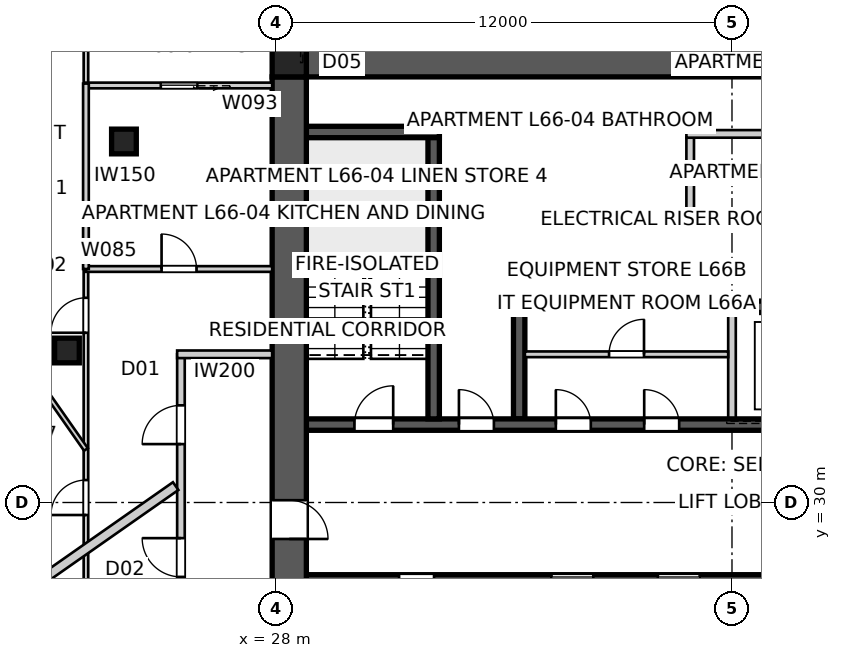
"""IFC4 building model, lengths in metres.
Left out: names, types, materials, properties, quantities, classifications, styles, units other than length and angle.
Written with IfcOpenShell. Run it as: python <this file> out.ifc"""

import sys

from ifc_helpers import new_model, si_unit, direction, frame, frame_2d, origin, origin_2d, place, context, subcontext, project, spatial, polyline, rectangle, outline, extrude, element, fill, save


model = new_model("IFC4")
c1 = context("Model", 3, precision=1e-05, world=origin(), true_north=direction((0.0, 1.0)))
c2 = subcontext(c1, "Body", "Model", "MODEL_VIEW")
j1 = project(units=[si_unit("LENGTHUNIT", "METRE"), si_unit("PLANEANGLEUNIT", "RADIAN")], contexts=[c1])
p1 = place(None, origin())
s1 = spatial("IfcSite", under=j1, at=p1, CompositionType="ELEMENT")
p2 = place(p1, origin())
s2 = spatial("IfcBuilding", under=s1, at=p2, CompositionType="ELEMENT")
p3 = place(p2, frame((0.0, 0.0, 240.4)))
s3 = spatial("IfcBuildingStorey", under=s2, at=p3, CompositionType="ELEMENT", Elevation=240.4)
p4 = place(p3, frame((28.8, 41.65, 0.0), z_axis=(0.0, 0.0, 1.0), x_axis=(1.0, 0.0, 0.0)))
e1 = element("IfcWall", 1, at=p4, inside=s3, PredefinedType="SHEAR", context=c2, shape_type="SweptSolid", body=[
    extrude(outline(polyline([(0.0, -0.45), (22.4, -0.45), (22.4, -0.025), (22.85, -0.025), (22.85, 0.025), (22.4, 0.025), (22.4, 0.45), (0.0, 0.45), (0.0, 0.025), (-0.45, 0.025), (-0.45, -0.025), (0.0, -0.025), (0.0, -0.45)])), origin(), (0.0, 0.0, 1.0), 3.4),
])
p5 = place(p3, frame((28.35, 41.2, 0.0), z_axis=(0.0, 0.0, 1.0), x_axis=(0.0, -1.0, 0.0)))
e2 = element("IfcWall", 2, at=p5, inside=s3, PredefinedType="SHEAR", context=c2, shape_type="SweptSolid", body=[
    extrude(outline(polyline([(0.0, -0.45), (22.4, -0.45), (22.4, -0.025), (22.85, -0.025), (22.85, 0.025), (22.4, 0.025), (22.4, 0.45), (0.0, 0.45), (0.0, 0.025), (-0.45, 0.025), (-0.45, -0.025), (0.0, -0.025), (0.0, -0.45)])), origin(), (0.0, 0.0, 1.0), 3.4),
])
p6 = place(p5, frame((11.14, 0.0, 0.0)))
e3 = element("IfcOpeningElement", 3, at=p6, cuts=e2, PredefinedType="OPENING", context=c2, shape_type="SweptSolid", body=[
    extrude(rectangle(XDim=1.02, YDim=2.4, at=frame_2d((0.51, 1.2))), frame((0.0, 0.46, 0.0), z_axis=(0.0, -1.0, 0.0), x_axis=(1.0, 0.0, 0.0)), (0.0, 0.0, 1.0), 0.92),
])
p7 = place(p3, frame((28.8, 32.05, 0.0), z_axis=(0.0, 0.0, 1.0), x_axis=(1.0, 0.0, 0.0)))
e4 = element("IfcWall", 4, at=p7, inside=s3, PredefinedType="SHEAR", context=c2, shape_type="SweptSolid", body=[
    extrude(rectangle(XDim=22.4, YDim=0.3, at=frame_2d((11.2, 0.0))), origin(), (0.0, 0.0, 1.0), 3.4),
])
p8 = place(p7, frame((19.04, 0.0, 0.0)))
e5 = element("IfcOpeningElement", 5, at=p8, cuts=e4, PredefinedType="OPENING", context=c2, shape_type="SweptSolid", body=[
    extrude(rectangle(XDim=0.92, YDim=2.1, at=frame_2d((0.46, 1.05))), frame((0.0, 0.16, 0.0), z_axis=(0.0, -1.0, 0.0), x_axis=(1.0, 0.0, 0.0)), (0.0, 0.0, 1.0), 0.32),
])
p9 = place(p7, frame((1.265, 0.0, 0.0)))
e6 = element("IfcOpeningElement", 6, at=p9, cuts=e4, PredefinedType="OPENING", context=c2, shape_type="SweptSolid", body=[
    extrude(rectangle(XDim=1.02, YDim=2.1, at=frame_2d((0.51, 1.05))), frame((0.0, 0.16, 0.0), z_axis=(0.0, -1.0, 0.0), x_axis=(1.0, 0.0, 0.0)), (0.0, 0.0, 1.0), 0.32),
])
p10 = place(p7, frame((4.015, 0.0, 0.0)))
e7 = element("IfcOpeningElement", 7, at=p10, cuts=e4, PredefinedType="OPENING", context=c2, shape_type="SweptSolid", body=[
    extrude(rectangle(XDim=0.92, YDim=2.1, at=frame_2d((0.46, 1.05))), frame((0.0, 0.16, 0.0), z_axis=(0.0, -1.0, 0.0), x_axis=(1.0, 0.0, 0.0)), (0.0, 0.0, 1.0), 0.32),
])
p11 = place(p7, frame((6.565, 0.0, 0.0)))
e8 = element("IfcOpeningElement", 8, at=p11, cuts=e4, PredefinedType="OPENING", context=c2, shape_type="SweptSolid", body=[
    extrude(rectangle(XDim=0.92, YDim=2.1, at=frame_2d((0.46, 1.05))), frame((0.0, 0.16, 0.0), z_axis=(0.0, -1.0, 0.0), x_axis=(1.0, 0.0, 0.0)), (0.0, 0.0, 1.0), 0.32),
])
p12 = place(p7, frame((8.89, 0.0, 0.0)))
e9 = element("IfcOpeningElement", 9, at=p12, cuts=e4, PredefinedType="OPENING", context=c2, shape_type="SweptSolid", body=[
    extrude(rectangle(XDim=0.92, YDim=2.1, at=frame_2d((0.46, 1.05))), frame((0.0, 0.16, 0.0), z_axis=(0.0, -1.0, 0.0), x_axis=(1.0, 0.0, 0.0)), (0.0, 0.0, 1.0), 0.32),
])
p13 = place(p7, frame((12.05, 0.0, 0.0)))
e10 = element("IfcOpeningElement", 10, at=p13, cuts=e4, PredefinedType="OPENING", context=c2, shape_type="SweptSolid", body=[
    extrude(rectangle(XDim=1.1, YDim=2.1, at=frame_2d((0.55, 1.05))), frame((0.0, 0.16, 0.0), z_axis=(0.0, -1.0, 0.0), x_axis=(1.0, 0.0, 0.0)), (0.0, 0.0, 1.0), 0.32),
])
p14 = place(p7, frame((14.85, 0.0, 0.0)))
e11 = element("IfcOpeningElement", 11, at=p14, cuts=e4, PredefinedType="OPENING", context=c2, shape_type="SweptSolid", body=[
    extrude(rectangle(XDim=1.1, YDim=2.1, at=frame_2d((0.55, 1.05))), frame((0.0, 0.16, 0.0), z_axis=(0.0, -1.0, 0.0), x_axis=(1.0, 0.0, 0.0)), (0.0, 0.0, 1.0), 0.32),
])
p15 = place(p3, frame((51.2, 27.95, 0.0), z_axis=(0.0, 0.0, 1.0), x_axis=(-1.0, 0.0, 0.0)))
e12 = element("IfcWall", 12, at=p15, inside=s3, PredefinedType="SHEAR", context=c2, shape_type="SweptSolid", body=[
    extrude(rectangle(XDim=22.4, YDim=0.3, at=frame_2d((11.2, 0.0))), origin(), (0.0, 0.0, 1.0), 3.4),
])
p16 = place(p15, frame((19.04, 0.0, 0.0)))
e13 = element("IfcOpeningElement", 13, at=p16, cuts=e12, PredefinedType="OPENING", context=c2, shape_type="SweptSolid", body=[
    extrude(rectangle(XDim=0.92, YDim=2.1, at=frame_2d((0.46, 1.05))), frame((0.0, 0.16, 0.0), z_axis=(0.0, -1.0, 0.0), x_axis=(1.0, 0.0, 0.0)), (0.0, 0.0, 1.0), 0.32),
])
p17 = place(p15, frame((1.265, 0.0, 0.0)))
e14 = element("IfcOpeningElement", 14, at=p17, cuts=e12, PredefinedType="OPENING", context=c2, shape_type="SweptSolid", body=[
    extrude(rectangle(XDim=1.02, YDim=2.1, at=frame_2d((0.51, 1.05))), frame((0.0, 0.16, 0.0), z_axis=(0.0, -1.0, 0.0), x_axis=(1.0, 0.0, 0.0)), (0.0, 0.0, 1.0), 0.32),
])
p18 = place(p15, frame((4.015, 0.0, 0.0)))
e15 = element("IfcOpeningElement", 15, at=p18, cuts=e12, PredefinedType="OPENING", context=c2, shape_type="SweptSolid", body=[
    extrude(rectangle(XDim=0.92, YDim=2.1, at=frame_2d((0.46, 1.05))), frame((0.0, 0.16, 0.0), z_axis=(0.0, -1.0, 0.0), x_axis=(1.0, 0.0, 0.0)), (0.0, 0.0, 1.0), 0.32),
])
p19 = place(p15, frame((8.89, 0.0, 0.0)))
e16 = element("IfcOpeningElement", 16, at=p19, cuts=e12, PredefinedType="OPENING", context=c2, shape_type="SweptSolid", body=[
    extrude(rectangle(XDim=0.92, YDim=2.1, at=frame_2d((0.46, 1.05))), frame((0.0, 0.16, 0.0), z_axis=(0.0, -1.0, 0.0), x_axis=(1.0, 0.0, 0.0)), (0.0, 0.0, 1.0), 0.32),
])
p20 = place(p15, frame((6.565, 0.0, 0.0)))
e17 = element("IfcOpeningElement", 17, at=p20, cuts=e12, PredefinedType="OPENING", context=c2, shape_type="SweptSolid", body=[
    extrude(rectangle(XDim=0.92, YDim=2.1, at=frame_2d((0.46, 1.05))), frame((0.0, 0.16, 0.0), z_axis=(0.0, -1.0, 0.0), x_axis=(1.0, 0.0, 0.0)), (0.0, 0.0, 1.0), 0.32),
])
p21 = place(p15, frame((12.05, 0.0, 0.0)))
e18 = element("IfcOpeningElement", 18, at=p21, cuts=e12, PredefinedType="OPENING", context=c2, shape_type="SweptSolid", body=[
    extrude(rectangle(XDim=1.1, YDim=2.1, at=frame_2d((0.55, 1.05))), frame((0.0, 0.16, 0.0), z_axis=(0.0, -1.0, 0.0), x_axis=(1.0, 0.0, 0.0)), (0.0, 0.0, 1.0), 0.32),
])
p22 = place(p15, frame((14.85, 0.0, 0.0)))
e19 = element("IfcOpeningElement", 19, at=p22, cuts=e12, PredefinedType="OPENING", context=c2, shape_type="SweptSolid", body=[
    extrude(rectangle(XDim=1.1, YDim=2.1, at=frame_2d((0.55, 1.05))), frame((0.0, 0.16, 0.0), z_axis=(0.0, -1.0, 0.0), x_axis=(1.0, 0.0, 0.0)), (0.0, 0.0, 1.0), 0.32),
])
p23 = place(p3, frame((34.25, 35.15, 0.0), z_axis=(0.0, 0.0, 1.0), x_axis=(1.0, 0.0, 0.0)))
e20 = element("IfcWall", 20, at=p23, inside=s3, PredefinedType="SHEAR", context=c2, shape_type="SweptSolid", body=[
    extrude(rectangle(XDim=11.5, YDim=0.3, at=frame_2d((5.75, 0.0))), origin(), (0.0, 0.0, 1.0), 3.4),
])
p24 = place(p3, frame((34.4, 32.2, 0.0), z_axis=(0.0, 0.0, 1.0), x_axis=(0.0, 1.0, 0.0)))
e21 = element("IfcWall", 21, at=p24, inside=s3, PredefinedType="SHEAR", context=c2, shape_type="SweptSolid", body=[
    extrude(rectangle(XDim=2.8, YDim=0.3, at=frame_2d((1.4, 0.0))), origin(), (0.0, 0.0, 1.0), 3.4),
])
p25 = place(p3, frame((40.0, 32.2, 0.0), z_axis=(0.0, 0.0, 1.0), x_axis=(0.0, 1.0, 0.0)))
e22 = element("IfcWall", 22, at=p25, inside=s3, PredefinedType="SOLIDWALL", context=c2, shape_type="SweptSolid", body=[
    extrude(rectangle(XDim=2.8, YDim=0.2, at=frame_2d((1.4, 0.0))), origin(), (0.0, 0.0, 1.0), 3.4),
])
p26 = place(p3, frame((32.15, 32.2, 0.0), z_axis=(0.0, 0.0, 1.0), x_axis=(0.0, 1.0, 0.0)))
e23 = element("IfcWall", 23, at=p26, inside=s3, PredefinedType="SHEAR", context=c2, shape_type="SweptSolid", body=[
    extrude(rectangle(XDim=7.7, YDim=0.3, at=frame_2d((3.85, 0.0))), origin(), (0.0, 0.0, 1.0), 3.4),
])
p27 = place(p3, frame((28.8, 39.75, 0.0), z_axis=(0.0, 0.0, 1.0), x_axis=(1.0, 0.0, 0.0)))
e24 = element("IfcWall", 24, at=p27, inside=s3, PredefinedType="SHEAR", context=c2, shape_type="SweptSolid", body=[
    extrude(rectangle(XDim=3.5, YDim=0.3, at=frame_2d((1.75, 0.0))), origin(), (0.0, 0.0, 1.0), 3.4),
])
p28 = place(p3, frame((38.9, 37.6, 0.0), z_axis=(0.0, 0.0, 1.0), x_axis=(0.0, 1.0, 0.0)))
e25 = element("IfcWall", 25, at=p28, inside=s3, PredefinedType="SOLIDWALL", context=c2, shape_type="SweptSolid", body=[
    extrude(rectangle(XDim=2.0, YDim=0.2, at=frame_2d((1.0, 0.0))), origin(), (0.0, 0.0, 1.0), 3.4),
])
for number, where, z_axis, x_axis in (
    (26, (38.8, 37.5, 0.0), (0.0, 0.0, 1.0), (1.0, 0.0, 0.0)),
    (27, (38.8, 39.7, 0.0), (0.0, 0.0, 1.0), (1.0, 0.0, 0.0)),
):
    element("IfcWall", number, at=place(p3, frame(where, z_axis=z_axis, x_axis=x_axis)), inside=s3, PredefinedType="SOLIDWALL", context=c2, shape_type="SweptSolid", body=[
        extrude(rectangle(XDim=2.4, YDim=0.2, at=frame_2d((1.2, 0.0))), origin(), (0.0, 0.0, 1.0), 3.4),
    ])
p29 = place(p3, frame((28.35, 41.65, 0.0), z_axis=(0.0, 0.0, 1.0), x_axis=(1.0, 0.0, 0.0)))
e28 = element("IfcColumn", 28, at=p29, inside=s3, PredefinedType="COLUMN", context=c2, shape_type="SweptSolid", body=[
    extrude(rectangle(XDim=0.9, YDim=0.9, at=origin_2d()), origin(), (0.0, 0.0, 1.0), 3.4),
])
for number, where, z_axis, x_axis in (
    (29, (24.0, 39.5, 0.0), (0.0, 0.0, 1.0), (1.0, 0.0, 0.0)),
    (30, (22.5, 34.0, 0.0), (0.0, 0.0, 1.0), (1.0, 0.0, 0.0)),
):
    element("IfcColumn", number, at=place(p3, frame(where, z_axis=z_axis, x_axis=x_axis)), inside=s3, PredefinedType="COLUMN", context=c2, shape_type="SweptSolid", body=[
        extrude(rectangle(XDim=0.65, YDim=0.65, at=origin_2d()), origin(), (0.0, 0.0, 1.0), 3.4),
    ])
p30 = place(p3, frame((25.5, 26.1, 0.0), z_axis=(0.0, 0.0, 1.0), x_axis=(0.0, 1.0, 0.0)))
e31 = element("IfcWall", 31, at=p30, inside=s3, PredefinedType="PARTITIONING", context=c2, shape_type="SweptSolid", body=[
    extrude(rectangle(XDim=7.8, YDim=0.2, at=frame_2d((3.9, 0.0))), origin(), (0.0, 0.0, 1.0), 3.25),
])
p31 = place(p30, frame((1.942, 0.0, 0.0)))
e32 = element("IfcOpeningElement", 32, at=p31, cuts=e31, PredefinedType="OPENING", context=c2, shape_type="SweptSolid", body=[
    extrude(rectangle(XDim=1.02, YDim=2.34, at=frame_2d((0.51, 1.17))), frame((0.0, 0.11, 0.0), z_axis=(0.0, -1.0, 0.0), x_axis=(1.0, 0.0, 0.0)), (0.0, 0.0, 1.0), 0.22),
])
p32 = place(p30, frame((5.437, 0.0, 0.0)))
e33 = element("IfcOpeningElement", 33, at=p32, cuts=e31, PredefinedType="OPENING", context=c2, shape_type="SweptSolid", body=[
    extrude(rectangle(XDim=1.02, YDim=2.34, at=frame_2d((0.51, 1.17))), frame((0.0, 0.11, 0.0), z_axis=(0.0, -1.0, 0.0), x_axis=(1.0, 0.0, 0.0)), (0.0, 0.0, 1.0), 0.22),
])
p33 = place(p3, frame((27.9, 33.9, 0.0), z_axis=(0.0, 0.0, 1.0), x_axis=(-1.0, 0.0, 0.0)))
e34 = element("IfcWall", 34, at=p33, inside=s3, PredefinedType="PARTITIONING", context=c2, shape_type="SweptSolid", body=[
    extrude(rectangle(XDim=2.5, YDim=0.2, at=frame_2d((1.25, 0.0))), origin(), (0.0, 0.0, 1.0), 3.25),
])
p34 = place(p3, frame((17.369, 24.836, 0.0), z_axis=(0.0, 0.0, 1.0), x_axis=(0.81915902312, 0.573566469418, 0.0)))
e35 = element("IfcWall", 35, at=p34, inside=s3, PredefinedType="PARTITIONING", context=c2, shape_type="SweptSolid", body=[
    extrude(rectangle(XDim=9.756, YDim=0.25, at=frame_2d((4.878, 0.0))), origin(), (0.0, 0.0, 1.0), 3.25),
])
p35 = place(p3, frame((23.0, 16.864, 0.0), z_axis=(0.0, 0.0, 1.0), x_axis=(0.0, 1.0, 0.0)))
e36 = element("IfcWall", 36, at=p35, inside=s3, PredefinedType="PARTITIONING", context=c2, shape_type="SweptSolid", body=[
    extrude(rectangle(XDim=19.28, YDim=0.12, at=frame_2d((9.64, 0.0))), origin(), (0.0, 0.0, 1.0), 2.55),
])
p36 = place(p35, frame((9.599, 0.0, 0.0)))
e37 = element("IfcOpeningElement", 37, at=p36, cuts=e36, PredefinedType="OPENING", context=c2, shape_type="SweptSolid", body=[
    extrude(rectangle(XDim=0.92, YDim=2.34, at=frame_2d((0.46, 1.17))), frame((0.0, 0.07, 0.0), z_axis=(0.0, -1.0, 0.0), x_axis=(1.0, 0.0, 0.0)), (0.0, 0.0, 1.0), 0.14),
])
p37 = place(p35, frame((17.603, 0.0, 0.0)))
e38 = element("IfcOpeningElement", 38, at=p37, cuts=e36, PredefinedType="OPENING", context=c2, shape_type="SweptSolid", body=[
    extrude(rectangle(XDim=0.92, YDim=2.34, at=frame_2d((0.46, 1.17))), frame((0.0, 0.07, 0.0), z_axis=(0.0, -1.0, 0.0), x_axis=(1.0, 0.0, 0.0)), (0.0, 0.0, 1.0), 0.14),
])
p38 = place(p35, frame((12.806, 0.0, 0.0)))
e39 = element("IfcOpeningElement", 39, at=p38, cuts=e36, PredefinedType="OPENING", context=c2, shape_type="SweptSolid", body=[
    extrude(rectangle(XDim=0.92, YDim=2.34, at=frame_2d((0.46, 1.17))), frame((0.0, 0.07, 0.0), z_axis=(0.0, -1.0, 0.0), x_axis=(1.0, 0.0, 0.0)), (0.0, 0.0, 1.0), 0.14),
])
p39 = place(p3, frame((23.0, 36.145, 0.0), z_axis=(0.0, 0.0, 1.0), x_axis=(1.0, 0.0, 0.0)))
e40 = element("IfcWall", 40, at=p39, inside=s3, PredefinedType="SOLIDWALL", context=c2, shape_type="SweptSolid", body=[
    extrude(rectangle(XDim=4.9, YDim=0.15, at=frame_2d((2.45, 0.0))), origin(), (0.0, 0.0, 1.0), 3.25),
])
p40 = place(p39, frame((1.99, 0.0, 0.0)))
e41 = element("IfcOpeningElement", 41, at=p40, cuts=e40, PredefinedType="OPENING", context=c2, shape_type="SweptSolid", body=[
    extrude(rectangle(XDim=0.92, YDim=2.34, at=frame_2d((0.46, 1.17))), frame((0.0, 0.085, 0.0), z_axis=(0.0, -1.0, 0.0), x_axis=(1.0, 0.0, 0.0)), (0.0, 0.0, 1.0), 0.17),
])
p41 = place(p3, frame((28.708, 41.18, 0.0), z_axis=(0.0, 0.0, 1.0), x_axis=(0.0, 1.0, 0.0)))
e42 = element("IfcWall", 42, at=p41, inside=s3, PredefinedType="PARTITIONING", context=c2, shape_type="SweptSolid", body=[
    extrude(rectangle(XDim=2.458, YDim=0.12, at=frame_2d((1.229, 0.0))), origin(), (0.0, 0.0, 1.0), 3.25),
])
p42 = place(p41, frame((1.259, 0.0, 0.0)))
e43 = element("IfcOpeningElement", 43, at=p42, cuts=e42, PredefinedType="OPENING", context=c2, shape_type="SweptSolid", body=[
    extrude(rectangle(XDim=0.96, YDim=2.1, at=frame_2d((0.48, 1.05))), frame((0.0, 0.07, 0.0), z_axis=(0.0, -1.0, 0.0), x_axis=(1.0, 0.0, 0.0)), (0.0, 0.0, 1.0), 0.14),
])
p43 = place(p3, frame((23.0, 41.024, 0.0), z_axis=(0.0, 0.0, 1.0), x_axis=(0.0, 1.0, 0.0)))
e44 = element("IfcWall", 44, at=p43, inside=s3, PredefinedType="PARTITIONING", context=c2, shape_type="SweptSolid", body=[
    extrude(rectangle(XDim=2.665, YDim=0.12, at=frame_2d((1.332, 0.0))), origin(), (0.0, 0.0, 1.0), 3.25),
])
p44 = place(p3, frame((27.9, 40.974, 0.0), z_axis=(0.0, 0.0, 1.0), x_axis=(-1.0, 0.0, 0.0)))
e45 = element("IfcWall", 45, at=p44, inside=s3, PredefinedType="SOLIDWALL", context=c2, shape_type="SweptSolid", body=[
    extrude(rectangle(XDim=4.9, YDim=0.15, at=frame_2d((2.45, 0.0))), origin(), (0.0, 0.0, 1.0), 3.25),
])
p45 = place(p44, frame((1.97, 0.0, 0.0)))
e46 = element("IfcOpeningElement", 46, at=p45, cuts=e45, PredefinedType="OPENING", context=c2, shape_type="SweptSolid", body=[
    extrude(rectangle(XDim=0.96, YDim=2.1, at=frame_2d((0.48, 1.05))), frame((0.0, 0.085, 0.0), z_axis=(0.0, -1.0, 0.0), x_axis=(1.0, 0.0, 0.0)), (0.0, 0.0, 1.0), 0.17),
])
p46 = place(p3, frame((23.0, 31.396, 0.0), z_axis=(0.0, 0.0, 1.0), x_axis=(-0.573575545802, 0.819152667857, 0.0)))
e47 = element("IfcWall", 47, at=p46, inside=s3, PredefinedType="PARTITIONING", context=c2, shape_type="SweptSolid", body=[
    extrude(rectangle(XDim=10.566, YDim=0.12, at=frame_2d((5.283, 0.0))), origin(), (0.0, 0.0, 1.0), 3.25),
])
p47 = place(p46, frame((3.958, 0.0, 0.0)))
e48 = element("IfcOpeningElement", 48, at=p47, cuts=e47, PredefinedType="OPENING", context=c2, shape_type="SweptSolid", body=[
    extrude(rectangle(XDim=0.92, YDim=2.34, at=frame_2d((0.46, 1.17))), frame((0.0, 0.07, 0.0), z_axis=(0.0, -1.0, 0.0), x_axis=(1.0, 0.0, 0.0)), (0.0, 0.0, 1.0), 0.14),
])
p48 = place(p46, frame((8.121, 0.0, 0.0)))
e49 = element("IfcOpeningElement", 49, at=p48, cuts=e47, PredefinedType="OPENING", context=c2, shape_type="SweptSolid", body=[
    extrude(rectangle(XDim=0.92, YDim=2.34, at=frame_2d((0.46, 1.17))), frame((0.0, 0.07, 0.0), z_axis=(0.0, -1.0, 0.0), x_axis=(1.0, 0.0, 0.0)), (0.0, 0.0, 1.0), 0.14),
])
p49 = place(p3, frame((23.0, 41.024, 0.0), z_axis=(0.0, 0.0, 1.0), x_axis=(0.0, -1.0, 0.0)))
e50 = element("IfcWall", 50, at=p49, inside=s3, PredefinedType="SOLIDWALL", context=c2, shape_type="SweptSolid", body=[
    extrude(rectangle(XDim=4.879, YDim=0.15, at=frame_2d((2.44, 0.0))), origin(), (0.0, 0.0, 1.0), 3.25),
])
p50 = place(p3, frame((34.55, 33.9, 0.0), z_axis=(0.0, 0.0, 1.0), x_axis=(1.0, 0.0, 0.0)))
e51 = element("IfcWall", 51, at=p50, inside=s3, PredefinedType="SOLIDWALL", context=c2, shape_type="SweptSolid", body=[
    extrude(rectangle(XDim=5.35, YDim=0.15, at=frame_2d((2.675, 0.0))), origin(), (0.0, 0.0, 1.0), 3.25),
])
p51 = place(p50, frame((2.215, 0.0, 0.0)))
e52 = element("IfcOpeningElement", 52, at=p51, cuts=e51, PredefinedType="OPENING", context=c2, shape_type="SweptSolid", body=[
    extrude(rectangle(XDim=0.92, YDim=2.1, at=frame_2d((0.46, 1.05))), frame((0.0, 0.085, 0.0), z_axis=(0.0, -1.0, 0.0), x_axis=(1.0, 0.0, 0.0)), (0.0, 0.0, 1.0), 0.17),
])
p52 = place(p9, origin())
e53 = element("IfcDoor", 53, at=p52, inside=s3, OperationType="SINGLE_SWING_RIGHT", PredefinedType="DOOR", context=c2, shape_type="SweptSolid", body=[
    extrude(rectangle(XDim=1.02, YDim=2.1, at=frame_2d((0.51, 1.05))), frame((0.0, 0.025, 0.0), z_axis=(0.0, -1.0, 0.0), x_axis=(1.0, 0.0, 0.0)), (0.0, 0.0, 1.0), 0.05),
])
fill(e6, e53)
p53 = place(p10, origin())
e54 = element("IfcDoor", 54, at=p53, inside=s3, OperationType="SINGLE_SWING_LEFT", PredefinedType="DOOR", context=c2, shape_type="SweptSolid", body=[
    extrude(rectangle(XDim=0.92, YDim=2.1, at=frame_2d((0.46, 1.05))), frame((0.0, 0.025, 0.0), z_axis=(0.0, -1.0, 0.0), x_axis=(1.0, 0.0, 0.0)), (0.0, 0.0, 1.0), 0.05),
])
fill(e7, e54)
p54 = place(p31, origin())
e55 = element("IfcDoor", 55, at=p54, inside=s3, OperationType="SINGLE_SWING_RIGHT", PredefinedType="DOOR", context=c2, shape_type="SweptSolid", body=[
    extrude(rectangle(XDim=1.02, YDim=2.34, at=frame_2d((0.51, 1.17))), frame((0.0, 0.025, 0.0), z_axis=(0.0, -1.0, 0.0), x_axis=(1.0, 0.0, 0.0)), (0.0, 0.0, 1.0), 0.05),
])
fill(e32, e55)
p55 = place(p32, origin())
e56 = element("IfcDoor", 56, at=p55, inside=s3, OperationType="SINGLE_SWING_LEFT", PredefinedType="DOOR", context=c2, shape_type="SweptSolid", body=[
    extrude(rectangle(XDim=1.02, YDim=2.34, at=frame_2d((0.51, 1.17))), frame((0.0, 0.025, 0.0), z_axis=(0.0, -1.0, 0.0), x_axis=(1.0, 0.0, 0.0)), (0.0, 0.0, 1.0), 0.05),
])
fill(e33, e56)
p56 = place(p40, origin())
e57 = element("IfcDoor", 57, at=p56, inside=s3, OperationType="SINGLE_SWING_LEFT", PredefinedType="DOOR", context=c2, shape_type="SweptSolid", body=[
    extrude(rectangle(XDim=0.92, YDim=2.34, at=frame_2d((0.46, 1.17))), frame((0.0, 0.025, 0.0), z_axis=(0.0, -1.0, 0.0), x_axis=(1.0, 0.0, 0.0)), (0.0, 0.0, 1.0), 0.05),
])
fill(e41, e57)
p57 = place(p37, origin())
e58 = element("IfcDoor", 58, at=p57, inside=s3, OperationType="SINGLE_SWING_LEFT", PredefinedType="DOOR", context=c2, shape_type="SweptSolid", body=[
    extrude(rectangle(XDim=0.92, YDim=2.34, at=frame_2d((0.46, 1.17))), frame((0.0, 0.025, 0.0), z_axis=(0.0, -1.0, 0.0), x_axis=(1.0, 0.0, 0.0)), (0.0, 0.0, 1.0), 0.05),
])
fill(e38, e58)
p58 = place(p38, origin())
e59 = element("IfcDoor", 59, at=p58, inside=s3, OperationType="SINGLE_SWING_LEFT", PredefinedType="DOOR", context=c2, shape_type="SweptSolid", body=[
    extrude(rectangle(XDim=0.92, YDim=2.34, at=frame_2d((0.46, 1.17))), frame((0.0, 0.025, 0.0), z_axis=(0.0, -1.0, 0.0), x_axis=(1.0, 0.0, 0.0)), (0.0, 0.0, 1.0), 0.05),
])
fill(e39, e59)
p59 = place(p45, origin())
e60 = element("IfcDoor", 60, at=p59, inside=s3, OperationType="SLIDING_TO_LEFT", PredefinedType="DOOR", context=c2, shape_type="SweptSolid", body=[
    extrude(rectangle(XDim=0.96, YDim=2.1, at=frame_2d((0.48, 1.05))), frame((0.0, 0.025, 0.0), z_axis=(0.0, -1.0, 0.0), x_axis=(1.0, 0.0, 0.0)), (0.0, 0.0, 1.0), 0.05),
])
fill(e46, e60)
p60 = place(p11, origin())
e61 = element("IfcDoor", 61, at=p60, inside=s3, OperationType="SINGLE_SWING_LEFT", PredefinedType="DOOR", context=c2, shape_type="SweptSolid", body=[
    extrude(rectangle(XDim=0.92, YDim=2.1, at=frame_2d((0.46, 1.05))), frame((0.0, 0.025, 0.0), z_axis=(0.0, -1.0, 0.0), x_axis=(1.0, 0.0, 0.0)), (0.0, 0.0, 1.0), 0.05),
])
fill(e8, e61)
p61 = place(p12, origin())
e62 = element("IfcDoor", 62, at=p61, inside=s3, OperationType="SINGLE_SWING_LEFT", PredefinedType="DOOR", context=c2, shape_type="SweptSolid", body=[
    extrude(rectangle(XDim=0.92, YDim=2.1, at=frame_2d((0.46, 1.05))), frame((0.0, 0.025, 0.0), z_axis=(0.0, -1.0, 0.0), x_axis=(1.0, 0.0, 0.0)), (0.0, 0.0, 1.0), 0.05),
])
fill(e9, e62)
p62 = place(p51, origin())
e63 = element("IfcDoor", 63, at=p62, inside=s3, OperationType="SINGLE_SWING_RIGHT", PredefinedType="DOOR", context=c2, shape_type="SweptSolid", body=[
    extrude(rectangle(XDim=0.92, YDim=2.1, at=frame_2d((0.46, 1.05))), frame((0.0, 0.025, 0.0), z_axis=(0.0, -1.0, 0.0), x_axis=(1.0, 0.0, 0.0)), (0.0, 0.0, 1.0), 0.05),
])
fill(e52, e63)
p63 = place(p6, origin())
e64 = element("IfcDoor", 64, at=p63, inside=s3, OperationType="SINGLE_SWING_RIGHT", PredefinedType="DOOR", context=c2, shape_type="SweptSolid", body=[
    extrude(rectangle(XDim=1.02, YDim=2.4, at=frame_2d((0.51, 1.2))), frame((0.0, 0.025, 0.0), z_axis=(0.0, -1.0, 0.0), x_axis=(1.0, 0.0, 0.0)), (0.0, 0.0, 1.0), 0.05),
])
fill(e3, e64)
save(model, sys.argv[1])
